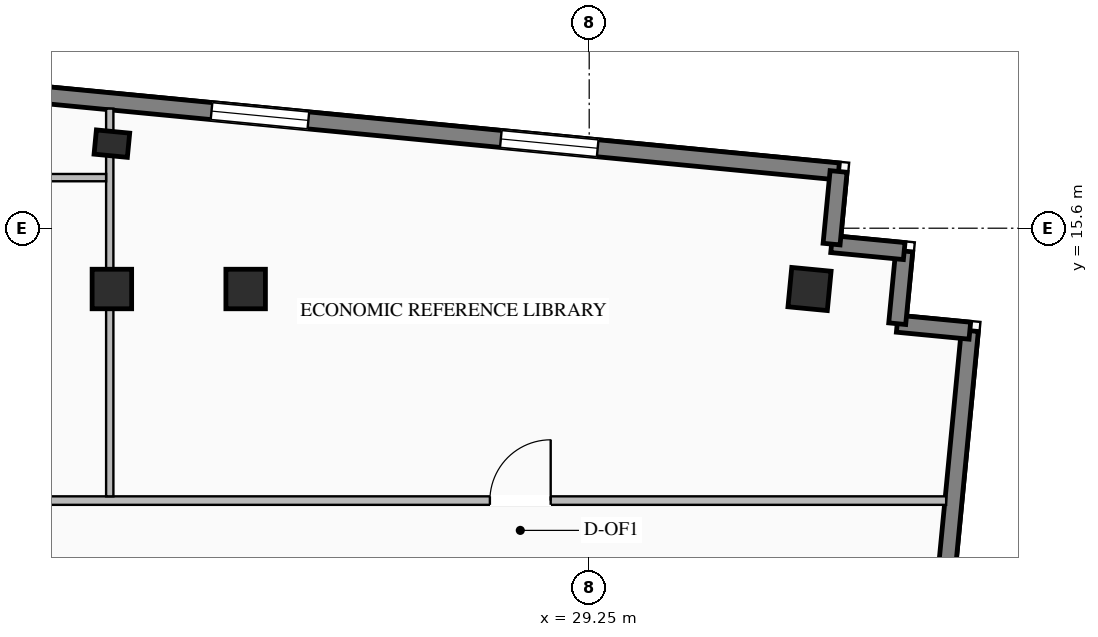
"""IFC4 building model, lengths in metres.
Left out: names, types, materials, properties, quantities, classifications, styles, units other than length and angle.
Written with IfcOpenShell. Run it as: python <this file> out.ifc"""

import sys

from ifc_helpers import new_model, si_unit, direction, frame, frame_2d, origin, origin_2d, place, context, subcontext, project, spatial, rectangle, i_section, extrude, element, fill, save


model = new_model("IFC4")
c1 = context("Model", 3, precision=1e-05, world=origin(), true_north=direction((0.0, 1.0)))
c2 = subcontext(c1, "Body", "Model", "MODEL_VIEW")
j1 = project(units=[si_unit("LENGTHUNIT", "METRE"), si_unit("PLANEANGLEUNIT", "RADIAN")], contexts=[c1])
p1 = place(None, origin())
s1 = spatial("IfcSite", under=j1, at=p1, CompositionType="ELEMENT")
p2 = place(p1, origin())
s2 = spatial("IfcBuilding", under=s1, at=p2, CompositionType="ELEMENT")
p3 = place(p2, frame((0.0, 0.0, 181.1)))
s3 = spatial("IfcBuildingStorey", under=s2, at=p3, CompositionType="ELEMENT", Elevation=181.1)
for number, where, z_axis, x_axis in (
    (1, (21.4, 14.6, 0.0), (0.0, 0.0, 1.0), (1.0, 0.0, 0.0)),
    (2, (23.6, 14.6, 0.0), (0.0, 0.0, 1.0), (1.0, 0.0, 0.0)),
    (3, (32.874, 14.6, 0.0), (0.0, 0.0, 1.0), (0.995, -0.096, 0.0)),
):
    element("IfcColumn", number, at=place(p3, frame(where, z_axis=z_axis, x_axis=x_axis)), inside=s3, PredefinedType="COLUMN", context=c2, shape_type="SweptSolid", body=[
        extrude(i_section(OverallWidth=0.65, OverallDepth=0.65, WebThickness=0.028, FlangeThickness=0.04, at=origin_2d()), origin(), (0.0, 0.0, 1.0), 3.45),
    ])
p4 = place(p3, frame((21.4, 16.991, 0.0), z_axis=(0.0, 0.0, 1.0), x_axis=(0.995396198367, -0.09584575252, 0.0)))
e4 = element("IfcColumn", 4, at=p4, inside=s3, PredefinedType="PILASTER", context=c2, shape_type="SweptSolid", body=[
    extrude(rectangle(XDim=0.55, YDim=0.4, at=origin_2d()), origin(), (0.0, 0.0, 1.0), 3.45),
])
p5 = place(p3, frame((19.077, 17.908, 0.0), z_axis=(0.0, 0.0, 1.0), x_axis=(0.995395606285, -0.095851901334, 0.0)))
e5 = element("IfcWall", 5, at=p5, inside=s3, PredefinedType="STANDARD", context=c2, shape_type="SweptSolid", body=[
    extrude(rectangle(XDim=14.34, YDim=0.28, at=frame_2d((7.17, 0.0))), origin(), (0.0, 0.0, 1.0), 3.25),
])
p6 = place(p5, frame((3.98, 0.0, 0.76)))
e6 = element("IfcOpeningElement", 6, at=p6, cuts=e5, PredefinedType="OPENING", context=c2, shape_type="SweptSolid", body=[
    extrude(rectangle(XDim=1.6, YDim=1.95, at=frame_2d((0.8, 0.975))), frame((0.0, 0.15, 0.0), z_axis=(0.0, -1.0, 0.0), x_axis=(1.0, 0.0, 0.0)), (0.0, 0.0, 1.0), 0.3),
])
p7 = place(p5, frame((8.76, 0.0, 0.76)))
e7 = element("IfcOpeningElement", 7, at=p7, cuts=e5, PredefinedType="OPENING", context=c2, shape_type="SweptSolid", body=[
    extrude(rectangle(XDim=1.6, YDim=1.95, at=frame_2d((0.8, 0.975))), frame((0.0, 0.15, 0.0), z_axis=(0.0, -1.0, 0.0), x_axis=(1.0, 0.0, 0.0)), (0.0, 0.0, 1.0), 0.3),
])
p8 = place(p3, frame((35.51, 13.914, 0.0), z_axis=(0.0, 0.0, 1.0), x_axis=(-0.095839027265, -0.995396845913, 0.0)))
e8 = element("IfcWall", 8, at=p8, inside=s3, PredefinedType="STANDARD", context=c2, shape_type="SweptSolid", body=[
    extrude(rectangle(XDim=16.79, YDim=0.28, at=frame_2d((8.395, 0.0))), origin(), (0.0, 0.0, 1.0), 3.25),
])
p9 = place(p8, frame((5.647, 0.0, 0.76)))
e9 = element("IfcOpeningElement", 9, at=p9, cuts=e8, PredefinedType="OPENING", context=c2, shape_type="SweptSolid", body=[
    extrude(rectangle(XDim=2.0, YDim=2.05, at=frame_2d((1.0, 1.025))), frame((0.0, 0.15, 0.0), z_axis=(0.0, -1.0, 0.0), x_axis=(1.0, 0.0, 0.0)), (0.0, 0.0, 1.0), 0.3),
])
p10 = place(p8, frame((9.643, 0.0, 0.76)))
e10 = element("IfcOpeningElement", 10, at=p10, cuts=e8, PredefinedType="OPENING", context=c2, shape_type="SweptSolid", body=[
    extrude(rectangle(XDim=2.0, YDim=2.05, at=frame_2d((1.0, 1.025))), frame((0.0, 0.15, 0.0), z_axis=(0.0, -1.0, 0.0), x_axis=(1.0, 0.0, 0.0)), (0.0, 0.0, 1.0), 0.3),
])
p11 = place(p3, frame((35.51, 13.914, 0.0), z_axis=(0.0, 0.0, 1.0), x_axis=(-0.995397091755, 0.095836473879, 0.0)))
e11 = element("IfcWall", 11, at=p11, inside=s3, PredefinedType="STANDARD", context=c2, shape_type="SweptSolid", body=[
    extrude(rectangle(XDim=1.2, YDim=0.28, at=frame_2d((0.6, 0.0))), origin(), (0.0, 0.0, 1.0), 3.25),
])
for number, where, z_axis, x_axis in (
    (12, (34.316, 14.029, 0.0), (0.0, 0.0, 1.0), (0.096, 0.995, 0.0)),
    (13, (34.431, 15.224, 0.0), (0.0, 0.0, 1.0), (-0.995, 0.096, 0.0)),
):
    element("IfcWall", number, at=place(p3, frame(where, z_axis=z_axis, x_axis=x_axis)), inside=s3, PredefinedType="STANDARD", context=c2, shape_type="SweptSolid", body=[
        extrude(rectangle(XDim=1.2, YDim=0.28, at=frame_2d((0.6, 0.0))), origin(), (0.0, 0.0, 1.0), 3.25),
    ])
p12 = place(p3, frame((33.236, 15.339, 0.0), z_axis=(0.0, 0.0, 1.0), x_axis=(0.095836473879, 0.995397091755, 0.0)))
e14 = element("IfcWall", 14, at=p12, inside=s3, PredefinedType="STANDARD", context=c2, shape_type="SweptSolid", body=[
    extrude(rectangle(XDim=1.2, YDim=0.28, at=frame_2d((0.6, 0.0))), origin(), (0.0, 0.0, 1.0), 3.25),
])
p13 = place(p3, frame((-25.398, 11.12, 0.0), z_axis=(0.0, 0.0, 1.0), x_axis=(1.0, 0.0, 0.0)))
e15 = element("IfcWall", 15, at=p13, inside=s3, PredefinedType="STANDARD", context=c2, shape_type="SweptSolid", body=[
    extrude(rectangle(XDim=60.519, YDim=0.14, at=frame_2d((30.259, 0.0))), origin(), (0.0, 0.0, 1.0), 3.25),
])
p14 = place(p13, frame((6.634, 0.0, 0.0)))
e16 = element("IfcOpeningElement", 16, at=p14, cuts=e15, PredefinedType="OPENING", context=c2, shape_type="SweptSolid", body=[
    extrude(rectangle(XDim=1.0, YDim=2.08, at=frame_2d((0.5, 1.04))), frame((0.0, 0.08, 0.0), z_axis=(0.0, -1.0, 0.0), x_axis=(1.0, 0.0, 0.0)), (0.0, 0.0, 1.0), 0.16),
])
p15 = place(p13, frame((21.702, 0.0, 0.0)))
e17 = element("IfcOpeningElement", 17, at=p15, cuts=e15, PredefinedType="OPENING", context=c2, shape_type="SweptSolid", body=[
    extrude(rectangle(XDim=1.0, YDim=2.08, at=frame_2d((0.5, 1.04))), frame((0.0, 0.08, 0.0), z_axis=(0.0, -1.0, 0.0), x_axis=(1.0, 0.0, 0.0)), (0.0, 0.0, 1.0), 0.16),
])
p16 = place(p13, frame((38.076, 0.0, 0.0)))
e18 = element("IfcOpeningElement", 18, at=p16, cuts=e15, PredefinedType="OPENING", context=c2, shape_type="SweptSolid", body=[
    extrude(rectangle(XDim=1.0, YDim=2.08, at=frame_2d((0.5, 1.04))), frame((0.0, 0.08, 0.0), z_axis=(0.0, -1.0, 0.0), x_axis=(1.0, 0.0, 0.0)), (0.0, 0.0, 1.0), 0.16),
])
p17 = place(p13, frame((53.015, 0.0, 0.0)))
e19 = element("IfcOpeningElement", 19, at=p17, cuts=e15, PredefinedType="OPENING", context=c2, shape_type="SweptSolid", body=[
    extrude(rectangle(XDim=1.0, YDim=2.08, at=frame_2d((0.5, 1.04))), frame((0.0, 0.08, 0.0), z_axis=(0.0, -1.0, 0.0), x_axis=(1.0, 0.0, 0.0)), (0.0, 0.0, 1.0), 0.16),
])
p18 = place(p3, frame((21.365, 11.19, 0.0), z_axis=(0.0, 0.0, 1.0), x_axis=(0.0, 1.0, 0.0)))
e20 = element("IfcWall", 20, at=p18, inside=s3, PredefinedType="STANDARD", context=c2, shape_type="SweptSolid", body=[
    extrude(rectangle(XDim=6.377, YDim=0.12, at=frame_2d((3.188, 0.0))), origin(), (0.0, 0.0, 1.0), 2.645),
])
p19 = place(p3, frame((-11.323, 16.432, 0.0), z_axis=(0.0, 0.0, 1.0), x_axis=(1.0, 0.0, 0.0)))
e21 = element("IfcWall", 21, at=p19, inside=s3, PredefinedType="STANDARD", context=c2, shape_type="SweptSolid", body=[
    extrude(rectangle(XDim=32.628, YDim=0.12, at=frame_2d((16.314, 0.0))), origin(), (0.0, 0.0, 1.0), 3.25),
])
p20 = place(p19, frame((7.784, 0.0, 0.0)))
e22 = element("IfcOpeningElement", 22, at=p20, cuts=e21, PredefinedType="OPENING", context=c2, shape_type="SweptSolid", body=[
    extrude(rectangle(XDim=1.0, YDim=2.08, at=frame_2d((0.5, 1.04))), frame((0.0, 0.07, 0.0), z_axis=(0.0, -1.0, 0.0), x_axis=(1.0, 0.0, 0.0)), (0.0, 0.0, 1.0), 0.14),
])
p21 = place(p19, frame((23.844, 0.0, 0.0)))
e23 = element("IfcOpeningElement", 23, at=p21, cuts=e21, PredefinedType="OPENING", context=c2, shape_type="SweptSolid", body=[
    extrude(rectangle(XDim=1.0, YDim=2.08, at=frame_2d((0.5, 1.04))), frame((0.0, 0.07, 0.0), z_axis=(0.0, -1.0, 0.0), x_axis=(1.0, 0.0, 0.0)), (0.0, 0.0, 1.0), 0.14),
])
p22 = place(p6, origin())
e24 = element("IfcWindow", 24, at=p22, inside=s3, PartitioningType="SINGLE_PANEL", PredefinedType="WINDOW", context=c2, shape_type="SweptSolid", body=[
    extrude(rectangle(XDim=1.6, YDim=1.95, at=frame_2d((0.8, 0.975))), frame((0.0, 0.03, 0.0), z_axis=(0.0, -1.0, 0.0), x_axis=(1.0, 0.0, 0.0)), (0.0, 0.0, 1.0), 0.06),
])
fill(e6, e24)
p23 = place(p7, origin())
e25 = element("IfcWindow", 25, at=p23, inside=s3, PartitioningType="SINGLE_PANEL", PredefinedType="WINDOW", context=c2, shape_type="SweptSolid", body=[
    extrude(rectangle(XDim=1.6, YDim=1.95, at=frame_2d((0.8, 0.975))), frame((0.0, 0.03, 0.0), z_axis=(0.0, -1.0, 0.0), x_axis=(1.0, 0.0, 0.0)), (0.0, 0.0, 1.0), 0.06),
])
fill(e7, e25)
p24 = place(p17, origin())
e26 = element("IfcDoor", 26, at=p24, inside=s3, OperationType="SINGLE_SWING_RIGHT", PredefinedType="DOOR", context=c2, shape_type="SweptSolid", body=[
    extrude(rectangle(XDim=1.0, YDim=2.08, at=frame_2d((0.5, 1.04))), frame((0.0, 0.025, 0.0), z_axis=(0.0, -1.0, 0.0), x_axis=(1.0, 0.0, 0.0)), (0.0, 0.0, 1.0), 0.05),
])
fill(e19, e26)
save(model, sys.argv[1])
